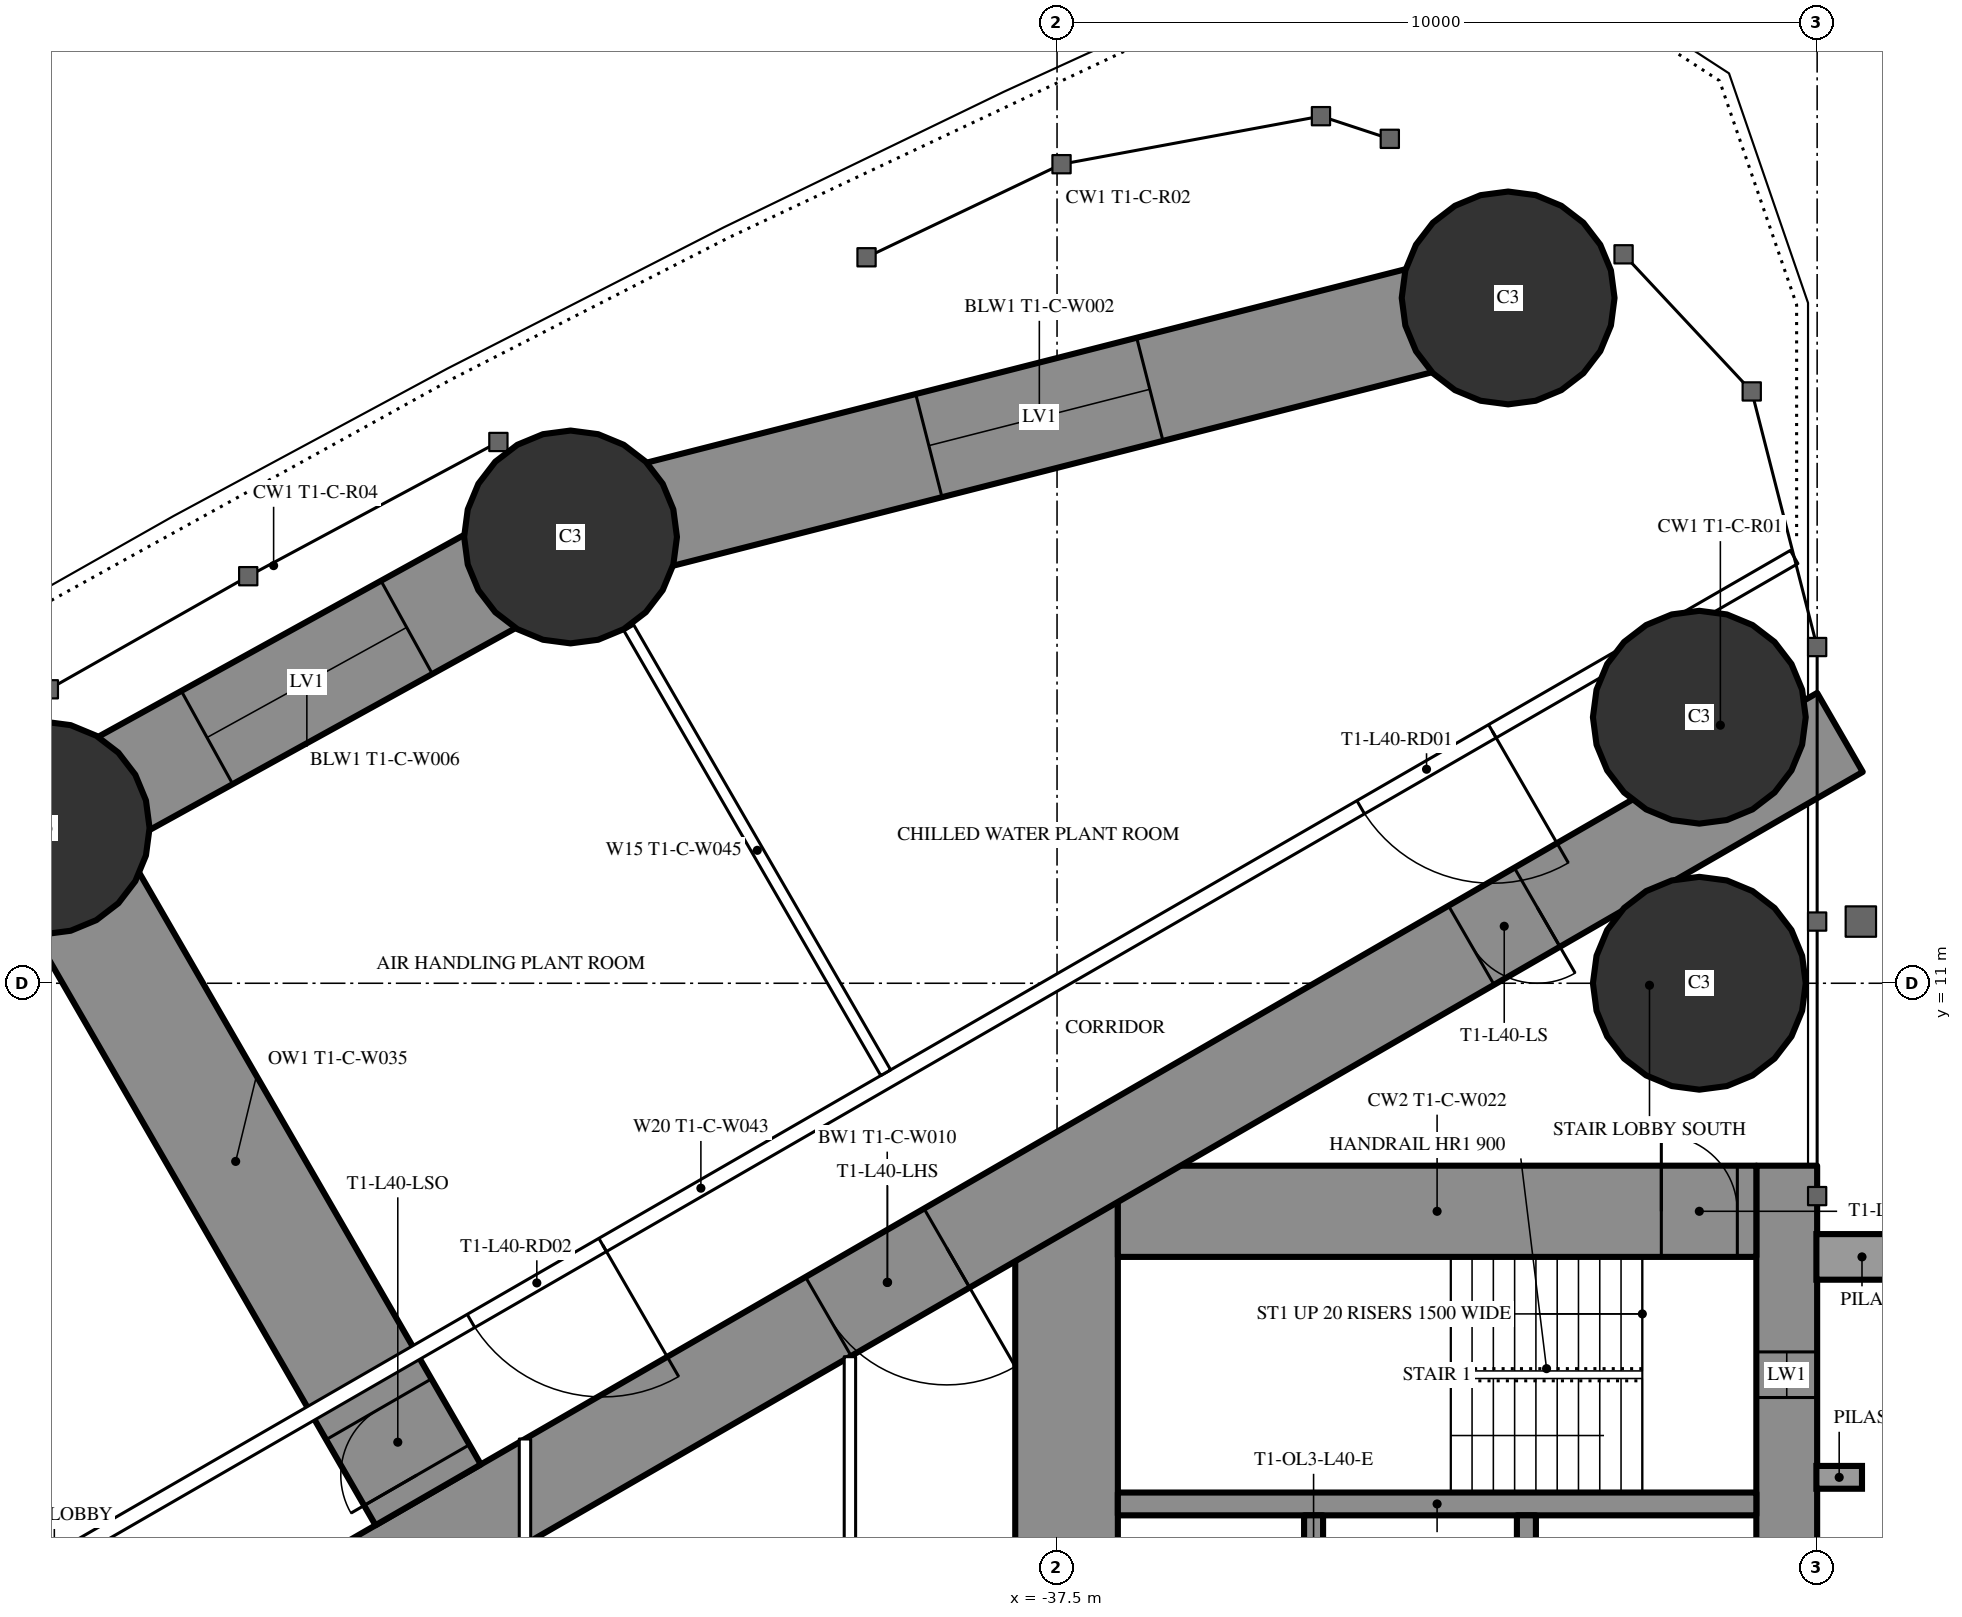
"""IFC4 building model, lengths in metres.
Left out: names, types, materials, properties, quantities, classifications, styles, units other than length and angle.
Written with IfcOpenShell. Run it as: python <this file> out.ifc"""

import sys

from ifc_helpers import new_model, si_unit, direction, frame, frame_2d, origin, origin_2d, place, context, subcontext, project, spatial, rectangle, circle, extrude, element, fill, save


model = new_model("IFC4")
c1 = context("Model", 3, precision=1e-05, world=origin(), true_north=direction((0.0, 1.0)))
c2 = subcontext(c1, "Body", "Model", "MODEL_VIEW")
j1 = project(units=[si_unit("LENGTHUNIT", "METRE"), si_unit("PLANEANGLEUNIT", "RADIAN")], contexts=[c1])
p1 = place(None, origin())
s1 = spatial("IfcSite", under=j1, at=p1, CompositionType="ELEMENT")
p2 = place(p1, origin())
s2 = spatial("IfcBuilding", under=s1, at=p2, CompositionType="ELEMENT")
p3 = place(p2, frame((0.0, 0.0, 152.7)))
s3 = spatial("IfcBuildingStorey", under=s2, at=p3, CompositionType="ELEMENT", Elevation=152.7)
for number, where, z_axis, x_axis in (
    (1, (-31.565, 20.016, 0.0), (0.0, 0.0, 1.0), (1.0, 0.0, 0.0)),
    (2, (-29.05, 11.0, 0.0), (0.0, 0.0, 1.0), (1.0, 0.0, 0.0)),
    (3, (-29.05, 14.5, 0.0), (0.0, 0.0, 1.0), (1.0, 0.0, 0.0)),
    (4, (-43.9, 16.871, 0.0), (0.0, 0.0, 1.0), (1.0, 0.0, 0.0)),
    (5, (-50.839, 13.043, 0.0), (0.0, 0.0, 1.0), (1.0, 0.0, 0.0)),
):
    element("IfcColumn", number, at=place(p3, frame(where, z_axis=z_axis, x_axis=x_axis)), inside=s3, PredefinedType="COLUMN", context=c2, shape_type="SweptSolid", body=[
        extrude(circle(Radius=1.4, at=origin_2d()), origin(), (0.0, 0.0, 1.0), 3.6),
    ])
p4 = place(p3, frame((-27.9, 8.6, 0.0), z_axis=(0.0, 0.0, 1.0), x_axis=(0.0, -1.0, 0.0)))
e6 = element("IfcWall", 6, at=p4, inside=s3, PredefinedType="SHEAR", context=c2, shape_type="SweptSolid", body=[
    extrude(rectangle(XDim=17.2, YDim=0.8, at=frame_2d((8.6, 0.0))), origin(), (0.0, 0.0, 1.0), 3.6),
])
p5 = place(p4, frame((2.45, 0.0, 0.6)))
e7 = element("IfcOpeningElement", 7, at=p5, cuts=e6, PredefinedType="OPENING", context=c2, shape_type="SweptSolid", body=[
    extrude(rectangle(XDim=0.6, YDim=2.1, at=frame_2d((0.3, 1.05))), frame((0.0, 0.41, 0.0), z_axis=(0.0, -1.0, 0.0), x_axis=(1.0, 0.0, 0.0)), (0.0, 0.0, 1.0), 0.82),
])
p6 = place(p4, frame((14.15, 0.0, 0.6)))
e8 = element("IfcOpeningElement", 8, at=p6, cuts=e6, PredefinedType="OPENING", context=c2, shape_type="SweptSolid", body=[
    extrude(rectangle(XDim=0.6, YDim=2.1, at=frame_2d((0.3, 1.05))), frame((0.0, 0.41, 0.0), z_axis=(0.0, -1.0, 0.0), x_axis=(1.0, 0.0, 0.0)), (0.0, 0.0, 1.0), 0.82),
])
p7 = place(p3, frame((-37.375, 8.6, 0.0), z_axis=(0.0, 0.0, 1.0), x_axis=(0.0, -1.0, 0.0)))
e9 = element("IfcWall", 9, at=p7, inside=s3, PredefinedType="SHEAR", context=c2, shape_type="SweptSolid", body=[
    extrude(rectangle(XDim=17.2, YDim=1.35, at=frame_2d((8.6, 0.0))), origin(), (0.0, 0.0, 1.0), 3.6),
])
p8 = place(p7, frame((7.7, 0.0, 0.0)))
e10 = element("IfcOpeningElement", 10, at=p8, cuts=e9, PredefinedType="OPENING", context=c2, shape_type="SweptSolid", body=[
    extrude(rectangle(XDim=1.8, YDim=2.2, at=frame_2d((0.9, 1.1))), frame((0.0, 0.685, 0.0), z_axis=(0.0, -1.0, 0.0), x_axis=(1.0, 0.0, 0.0)), (0.0, 0.0, 1.0), 1.37),
])
p9 = place(p3, frame((-28.3, 8.0, 0.0), z_axis=(0.0, 0.0, 1.0), x_axis=(-1.0, 0.0, 0.0)))
e11 = element("IfcWall", 11, at=p9, inside=s3, PredefinedType="SHEAR", context=c2, shape_type="SweptSolid", body=[
    extrude(rectangle(XDim=8.4, YDim=1.2, at=frame_2d((4.2, 0.0))), origin(), (0.0, 0.0, 1.0), 3.6),
])
p10 = place(p9, frame((0.25, 0.0, 0.0)))
e12 = element("IfcOpeningElement", 12, at=p10, cuts=e11, PredefinedType="OPENING", context=c2, shape_type="SweptSolid", body=[
    extrude(rectangle(XDim=1.0, YDim=2.2, at=frame_2d((0.5, 1.1))), frame((0.0, 0.61, 0.0), z_axis=(0.0, -1.0, 0.0), x_axis=(1.0, 0.0, 0.0)), (0.0, 0.0, 1.0), 1.22),
])
p11 = place(p3, frame((-28.3, 4.15, 0.0), z_axis=(0.0, 0.0, 1.0), x_axis=(-1.0, 0.0, 0.0)))
e13 = element("IfcWall", 13, at=p11, inside=s3, PredefinedType="SHEAR", context=c2, shape_type="SweptSolid", body=[
    extrude(rectangle(XDim=8.4, YDim=0.3, at=frame_2d((4.2, 0.0))), origin(), (0.0, 0.0, 1.0), 3.6),
])
p12 = place(p3, frame((-31.325, 4.0, 0.0), z_axis=(0.0, 0.0, 1.0), x_axis=(0.0, -1.0, 0.0)))
e14 = element("IfcWall", 14, at=p12, inside=s3, PredefinedType="SHEAR", context=c2, shape_type="SweptSolid", body=[
    extrude(rectangle(XDim=2.1, YDim=0.25, at=frame_2d((1.05, 0.0))), origin(), (0.0, 0.0, 1.0), 3.6),
])
p13 = place(p12, frame((0.5, 0.0, 0.0)))
e15 = element("IfcOpeningElement", 15, at=p13, cuts=e14, PredefinedType="OPENING", context=c2, shape_type="SweptSolid", body=[
    extrude(rectangle(XDim=1.1, YDim=2.2, at=frame_2d((0.55, 1.1))), frame((0.0, 0.135, 0.0), z_axis=(0.0, -1.0, 0.0), x_axis=(1.0, 0.0, 0.0)), (0.0, 0.0, 1.0), 0.27),
])
p14 = place(p3, frame((-34.125, 4.0, 0.0), z_axis=(0.0, 0.0, 1.0), x_axis=(0.0, -1.0, 0.0)))
e16 = element("IfcWall", 16, at=p14, inside=s3, PredefinedType="SHEAR", context=c2, shape_type="SweptSolid", body=[
    extrude(rectangle(XDim=2.35, YDim=0.25, at=frame_2d((1.175, 0.0))), origin(), (0.0, 0.0, 1.0), 3.6),
])
p15 = place(p14, frame((0.875, 0.0, 0.0)))
e17 = element("IfcOpeningElement", 17, at=p15, cuts=e16, PredefinedType="OPENING", context=c2, shape_type="SweptSolid", body=[
    extrude(rectangle(XDim=0.6, YDim=2.0, at=frame_2d((0.3, 1.0))), frame((0.0, 0.135, 0.0), z_axis=(0.0, -1.0, 0.0), x_axis=(1.0, 0.0, 0.0)), (0.0, 0.0, 1.0), 0.27),
])
p16 = place(p3, frame((-27.2, 14.3, 0.0), z_axis=(0.0, 0.0, 1.0), x_axis=(-0.866026593062, -0.499997940104, 0.0)))
e18 = element("IfcWall", 18, at=p16, inside=s3, PredefinedType="SHEAR", context=c2, shape_type="SweptSolid", body=[
    extrude(rectangle(XDim=28.946, YDim=1.2, at=frame_2d((14.473, 0.0))), origin(), (0.0, 0.0, 1.0), 3.6),
])
p17 = place(p16, frame((4.6, 0.0, 0.0)))
e19 = element("IfcOpeningElement", 19, at=p17, cuts=e18, PredefinedType="OPENING", context=c2, shape_type="SweptSolid", body=[
    extrude(rectangle(XDim=1.0, YDim=2.2, at=frame_2d((0.5, 1.1))), frame((0.0, 0.61, 0.0), z_axis=(0.0, -1.0, 0.0), x_axis=(1.0, 0.0, 0.0)), (0.0, 0.0, 1.0), 1.22),
])
p18 = place(p16, frame((13.568, 0.0, 0.0)))
e20 = element("IfcOpeningElement", 20, at=p18, cuts=e18, PredefinedType="OPENING", context=c2, shape_type="SweptSolid", body=[
    extrude(rectangle(XDim=1.8, YDim=2.04, at=frame_2d((0.9, 1.02))), frame((0.0, 0.61, 0.0), z_axis=(0.0, -1.0, 0.0), x_axis=(1.0, 0.0, 0.0)), (0.0, 0.0, 1.0), 1.22),
])
p19 = place(p3, frame((-45.773, 4.27, 0.0), z_axis=(0.0, 0.0, 1.0), x_axis=(-0.499995723283, 0.866027872934, 0.0)))
e21 = element("IfcWall", 21, at=p19, inside=s3, PredefinedType="SHEAR", context=c2, shape_type="SweptSolid", body=[
    extrude(rectangle(XDim=10.131, YDim=1.6, at=frame_2d((5.065, 0.0))), origin(), (0.0, 0.0, 1.0), 3.6),
])
p20 = place(p19, frame((0.3, 0.0, 0.0)))
e22 = element("IfcOpeningElement", 22, at=p20, cuts=e21, PredefinedType="OPENING", context=c2, shape_type="SweptSolid", body=[
    extrude(rectangle(XDim=1.0, YDim=2.2, at=frame_2d((0.5, 1.1))), frame((0.0, 0.81, 0.0), z_axis=(0.0, -1.0, 0.0), x_axis=(1.0, 0.0, 0.0)), (0.0, 0.0, 1.0), 1.62),
])
p21 = place(p3, frame((-31.565, 20.016, 0.0), z_axis=(0.0, 0.0, 1.0), x_axis=(-0.969008414312, -0.247027717052, 0.0)))
e23 = element("IfcWall", 23, at=p21, inside=s3, PredefinedType="SHEAR", context=c2, shape_type="SweptSolid", body=[
    extrude(rectangle(XDim=12.729, YDim=1.4, at=frame_2d((6.365, 0.0))), origin(), (0.0, 0.0, 1.0), 3.6),
])
p22 = place(p21, frame((4.865, 0.0, 0.6)))
e24 = element("IfcOpeningElement", 24, at=p22, cuts=e23, PredefinedType="OPENING", context=c2, shape_type="SweptSolid", body=[
    extrude(rectangle(XDim=3.0, YDim=1.2, at=frame_2d((1.5, 0.6))), frame((0.0, 0.71, 0.0), z_axis=(0.0, -1.0, 0.0), x_axis=(1.0, 0.0, 0.0)), (0.0, 0.0, 1.0), 1.42),
])
p23 = place(p3, frame((-43.9, 16.871, 0.0), z_axis=(0.0, 0.0, 1.0), x_axis=(-0.875577684027, -0.483077342911, 0.0)))
e25 = element("IfcWall", 25, at=p23, inside=s3, PredefinedType="SHEAR", context=c2, shape_type="SweptSolid", body=[
    extrude(rectangle(XDim=7.925, YDim=1.4, at=frame_2d((3.962, 0.0))), origin(), (0.0, 0.0, 1.0), 3.6),
])
p24 = place(p23, frame((2.462, 0.0, 0.6)))
e26 = element("IfcOpeningElement", 26, at=p24, cuts=e25, PredefinedType="OPENING", context=c2, shape_type="SweptSolid", body=[
    extrude(rectangle(XDim=3.0, YDim=1.2, at=frame_2d((1.5, 0.6))), frame((0.0, 0.71, 0.0), z_axis=(0.0, -1.0, 0.0), x_axis=(1.0, 0.0, 0.0)), (0.0, 0.0, 1.0), 1.42),
])
p25 = place(p3, frame((-50.839, 13.043, 0.0), z_axis=(0.0, 0.0, 1.0), x_axis=(-0.851892008043, -0.523717487423, 0.0)))
e27 = element("IfcWall", 27, at=p25, inside=s3, PredefinedType="SHEAR", context=c2, shape_type="SweptSolid", body=[
    extrude(rectangle(XDim=7.924, YDim=1.4, at=frame_2d((3.962, 0.0))), origin(), (0.0, 0.0, 1.0), 3.6),
])
p26 = place(p25, frame((2.462, 0.0, 0.6)))
e28 = element("IfcOpeningElement", 28, at=p26, cuts=e27, PredefinedType="OPENING", context=c2, shape_type="SweptSolid", body=[
    extrude(rectangle(XDim=3.0, YDim=1.2, at=frame_2d((1.5, 0.6))), frame((0.0, 0.71, 0.0), z_axis=(0.0, -1.0, 0.0), x_axis=(1.0, 0.0, 0.0)), (0.0, 0.0, 1.0), 1.42),
])
p27 = place(p3, frame((-27.803, 16.608, 0.0), z_axis=(0.0, 0.0, 1.0), x_axis=(-0.866025851808, -0.499999223999, 0.0)))
e29 = element("IfcWall", 29, at=p27, inside=s3, PredefinedType="PARTITIONING", context=c2, shape_type="SweptSolid", body=[
    extrude(rectangle(XDim=33.215, YDim=0.2, at=frame_2d((16.608, 0.0))), origin(), (0.0, 0.0, 1.0), 3.35),
])
p28 = place(p27, frame((4.584, 0.0, 0.0)))
e30 = element("IfcOpeningElement", 30, at=p28, cuts=e29, PredefinedType="OPENING", context=c2, shape_type="SweptSolid", body=[
    extrude(rectangle(XDim=2.0, YDim=2.4, at=frame_2d((1.0, 1.2))), frame((0.0, 0.11, 0.0), z_axis=(0.0, -1.0, 0.0), x_axis=(1.0, 0.0, 0.0)), (0.0, 0.0, 1.0), 0.22),
])
p29 = place(p27, frame((18.1, 0.0, 0.0)))
e31 = element("IfcOpeningElement", 31, at=p29, cuts=e29, PredefinedType="OPENING", context=c2, shape_type="SweptSolid", body=[
    extrude(rectangle(XDim=2.0, YDim=2.4, at=frame_2d((1.0, 1.2))), frame((0.0, 0.11, 0.0), z_axis=(0.0, -1.0, 0.0), x_axis=(1.0, 0.0, 0.0)), (0.0, 0.0, 1.0), 0.22),
])
p30 = place(p27, frame((26.147, 0.0, 0.0)))
e32 = element("IfcOpeningElement", 32, at=p30, cuts=e29, PredefinedType="OPENING", context=c2, shape_type="SweptSolid", body=[
    extrude(rectangle(XDim=2.0, YDim=2.4, at=frame_2d((1.0, 1.2))), frame((0.0, 0.11, 0.0), z_axis=(0.0, -1.0, 0.0), x_axis=(1.0, 0.0, 0.0)), (0.0, 0.0, 1.0), 0.22),
])
p31 = place(p3, frame((-39.754, 9.823, 0.0), z_axis=(0.0, 0.0, 1.0), x_axis=(-0.499997670926, 0.866026748472, 0.0)))
e33 = element("IfcWall", 33, at=p31, inside=s3, PredefinedType="PARTITIONING", context=c2, shape_type="SweptSolid", body=[
    extrude(rectangle(XDim=6.757, YDim=0.15, at=frame_2d((3.379, 0.0))), origin(), (0.0, 0.0, 1.0), 2.4),
])
p32 = place(p3, frame((-40.225, 6.087, 0.0), z_axis=(0.0, 0.0, 1.0), x_axis=(0.0, -1.0, 0.0)))
e34 = element("IfcWall", 34, at=p32, inside=s3, PredefinedType="PARTITIONING", context=c2, shape_type="SweptSolid", body=[
    extrude(rectangle(XDim=12.174, YDim=0.15, at=frame_2d((6.087, 0.0))), origin(), (0.0, 0.0, 1.0), 3.35),
])
p33 = place(p32, frame((5.187, 0.0, 0.0)))
e35 = element("IfcOpeningElement", 35, at=p33, cuts=e34, PredefinedType="OPENING", context=c2, shape_type="SweptSolid", body=[
    extrude(rectangle(XDim=1.8, YDim=2.2, at=frame_2d((0.9, 1.1))), frame((0.0, 0.085, 0.0), z_axis=(0.0, -1.0, 0.0), x_axis=(1.0, 0.0, 0.0)), (0.0, 0.0, 1.0), 0.17),
])
p34 = place(p3, frame((-44.5, 5.005, 0.0), z_axis=(0.0, 0.0, 1.0), x_axis=(0.0, -1.0, 0.0)))
e36 = element("IfcWall", 36, at=p34, inside=s3, PredefinedType="PARTITIONING", context=c2, shape_type="SweptSolid", body=[
    extrude(rectangle(XDim=10.009, YDim=0.15, at=frame_2d((5.005, 0.0))), origin(), (0.0, 0.0, 1.0), 3.35),
])
p35 = place(p34, frame((4.505, 0.0, 0.0)))
e37 = element("IfcOpeningElement", 37, at=p35, cuts=e36, PredefinedType="OPENING", context=c2, shape_type="SweptSolid", body=[
    extrude(rectangle(XDim=1.0, YDim=2.2, at=frame_2d((0.5, 1.1))), frame((0.0, 0.085, 0.0), z_axis=(0.0, -1.0, 0.0), x_axis=(1.0, 0.0, 0.0)), (0.0, 0.0, 1.0), 0.17),
])
p36 = place(p22, origin())
e38 = element("IfcWindow", 38, at=p36, inside=s3, PartitioningType="SINGLE_PANEL", PredefinedType="WINDOW", context=c2, shape_type="SweptSolid", body=[
    extrude(rectangle(XDim=3.0, YDim=1.2, at=frame_2d((1.5, 0.6))), frame((0.0, 0.03, 0.0), z_axis=(0.0, -1.0, 0.0), x_axis=(1.0, 0.0, 0.0)), (0.0, 0.0, 1.0), 0.06),
])
fill(e24, e38)
p37 = place(p24, origin())
e39 = element("IfcWindow", 39, at=p37, inside=s3, PartitioningType="SINGLE_PANEL", PredefinedType="WINDOW", context=c2, shape_type="SweptSolid", body=[
    extrude(rectangle(XDim=3.0, YDim=1.2, at=frame_2d((1.5, 0.6))), frame((0.0, 0.03, 0.0), z_axis=(0.0, -1.0, 0.0), x_axis=(1.0, 0.0, 0.0)), (0.0, 0.0, 1.0), 0.06),
])
fill(e26, e39)
p38 = place(p20, origin())
e40 = element("IfcDoor", 40, at=p38, inside=s3, OperationType="SINGLE_SWING_LEFT", PredefinedType="DOOR", context=c2, shape_type="SweptSolid", body=[
    extrude(rectangle(XDim=1.0, YDim=2.2, at=frame_2d((0.5, 1.1))), frame((0.0, 0.025, 0.0), z_axis=(0.0, -1.0, 0.0), x_axis=(1.0, 0.0, 0.0)), (0.0, 0.0, 1.0), 0.05),
])
fill(e22, e40)
p39 = place(p28, origin())
e41 = element("IfcDoor", 41, at=p39, inside=s3, OperationType="DOUBLE_DOOR_SINGLE_SWING", PredefinedType="DOOR", context=c2, shape_type="SweptSolid", body=[
    extrude(rectangle(XDim=2.0, YDim=2.4, at=frame_2d((1.0, 1.2))), frame((0.0, 0.025, 0.0), z_axis=(0.0, -1.0, 0.0), x_axis=(1.0, 0.0, 0.0)), (0.0, 0.0, 1.0), 0.05),
])
fill(e30, e41)
p40 = place(p29, origin())
e42 = element("IfcDoor", 42, at=p40, inside=s3, OperationType="DOUBLE_DOOR_SINGLE_SWING", PredefinedType="DOOR", context=c2, shape_type="SweptSolid", body=[
    extrude(rectangle(XDim=2.0, YDim=2.4, at=frame_2d((1.0, 1.2))), frame((0.0, 0.025, 0.0), z_axis=(0.0, -1.0, 0.0), x_axis=(1.0, 0.0, 0.0)), (0.0, 0.0, 1.0), 0.05),
])
fill(e31, e42)
p41 = place(p17, origin())
e43 = element("IfcDoor", 43, at=p41, inside=s3, OperationType="SINGLE_SWING_LEFT", PredefinedType="DOOR", context=c2, shape_type="SweptSolid", body=[
    extrude(rectangle(XDim=1.0, YDim=2.2, at=frame_2d((0.5, 1.1))), frame((0.0, 0.025, 0.0), z_axis=(0.0, -1.0, 0.0), x_axis=(1.0, 0.0, 0.0)), (0.0, 0.0, 1.0), 0.05),
])
fill(e19, e43)
p42 = place(p18, origin())
e44 = element("IfcDoor", 44, at=p42, inside=s3, OperationType="DOUBLE_DOOR_SINGLE_SWING", PredefinedType="DOOR", context=c2, shape_type="SweptSolid", body=[
    extrude(rectangle(XDim=1.8, YDim=2.04, at=frame_2d((0.9, 1.02))), frame((0.0, 0.025, 0.0), z_axis=(0.0, -1.0, 0.0), x_axis=(1.0, 0.0, 0.0)), (0.0, 0.0, 1.0), 0.05),
])
fill(e20, e44)
p43 = place(p10, origin())
e45 = element("IfcDoor", 45, at=p43, inside=s3, OperationType="SINGLE_SWING_RIGHT", PredefinedType="DOOR", context=c2, shape_type="SweptSolid", body=[
    extrude(rectangle(XDim=1.0, YDim=2.2, at=frame_2d((0.5, 1.1))), frame((0.0, 0.025, 0.0), z_axis=(0.0, -1.0, 0.0), x_axis=(1.0, 0.0, 0.0)), (0.0, 0.0, 1.0), 0.05),
])
fill(e12, e45)
p44 = place(p5, origin())
e46 = element("IfcWindow", 46, at=p44, inside=s3, PartitioningType="SINGLE_PANEL", PredefinedType="WINDOW", context=c2, shape_type="SweptSolid", body=[
    extrude(rectangle(XDim=0.6, YDim=2.1, at=frame_2d((0.3, 1.05))), frame((0.0, 0.03, 0.0), z_axis=(0.0, -1.0, 0.0), x_axis=(1.0, 0.0, 0.0)), (0.0, 0.0, 1.0), 0.06),
])
fill(e7, e46)
save(model, sys.argv[1])
